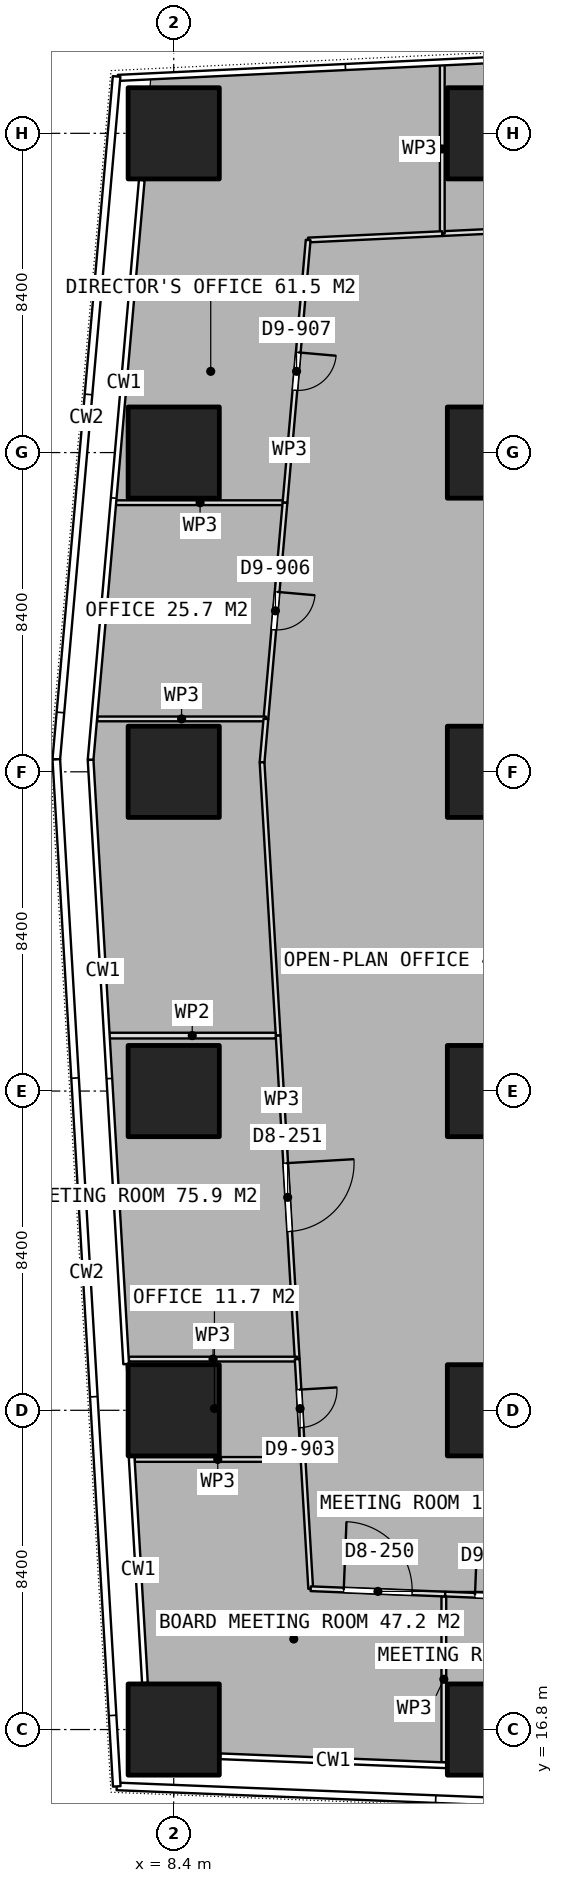
"""IFC4 building model, lengths in metres.
Left out: names, types, materials, properties, quantities, classifications, styles, units other than length and angle.
Written with IfcOpenShell. Run it as: python <this file> out.ifc"""

import sys

from ifc_helpers import new_model, si_unit, direction, frame, frame_2d, origin, origin_2d, place, context, subcontext, project, spatial, rectangle, extrude, element, fill, save


model = new_model("IFC4")
c1 = context("Model", 3, precision=1e-05, world=origin(), true_north=direction((0.0, 1.0)))
c2 = subcontext(c1, "Body", "Model", "MODEL_VIEW")
j1 = project(units=[si_unit("LENGTHUNIT", "METRE"), si_unit("PLANEANGLEUNIT", "RADIAN")], contexts=[c1])
p1 = place(None, origin())
s1 = spatial("IfcSite", under=j1, at=p1, CompositionType="ELEMENT")
p2 = place(p1, origin())
s2 = spatial("IfcBuilding", under=s1, at=p2, CompositionType="ELEMENT")
p3 = place(p2, frame((0.0, 0.0, 228.95)))
s3 = spatial("IfcBuildingStorey", under=s2, at=p3, CompositionType="ELEMENT", Elevation=228.95)
for number, where, z_axis, x_axis in (
    (1, (8.4, 16.8, 0.0), (0.0, 0.0, 1.0), (1.0, 0.0, 0.0)),
    (2, (8.4, 25.2, 0.0), (0.0, 0.0, 1.0), (1.0, 0.0, 0.0)),
    (3, (8.4, 33.6, 0.0), (0.0, 0.0, 1.0), (1.0, 0.0, 0.0)),
    (4, (8.4, 42.0, 0.0), (0.0, 0.0, 1.0), (1.0, 0.0, 0.0)),
    (5, (8.4, 50.4, 0.0), (0.0, 0.0, 1.0), (1.0, 0.0, 0.0)),
    (6, (8.4, 58.8, 0.0), (0.0, 0.0, 1.0), (1.0, 0.0, 0.0)),
    (7, (16.8, 16.8, 0.0), (0.0, 0.0, 1.0), (1.0, 0.0, 0.0)),
    (8, (16.8, 25.2, 0.0), (0.0, 0.0, 1.0), (1.0, 0.0, 0.0)),
    (9, (16.8, 33.6, 0.0), (0.0, 0.0, 1.0), (1.0, 0.0, 0.0)),
    (10, (16.8, 42.0, 0.0), (0.0, 0.0, 1.0), (1.0, 0.0, 0.0)),
    (11, (16.8, 50.4, 0.0), (0.0, 0.0, 1.0), (1.0, 0.0, 0.0)),
    (12, (16.8, 58.8, 0.0), (0.0, 0.0, 1.0), (1.0, 0.0, 0.0)),
):
    element("IfcColumn", number, at=place(p3, frame(where, z_axis=z_axis, x_axis=x_axis)), inside=s3, PredefinedType="COLUMN", context=c2, shape_type="SweptSolid", body=[
        extrude(rectangle(XDim=2.4, YDim=2.4, at=origin_2d()), origin(), (0.0, 0.0, 1.0), 3.75),
    ])
p4 = place(p3, frame((23.792, 56.559, 0.0), z_axis=(0.0, 0.0, 1.0), x_axis=(-0.998858041753, -0.047776693337, 0.0)))
e13 = element("IfcWall", 13, at=p4, inside=s3, PredefinedType="PARTITIONING", context=c2, shape_type="SweptSolid", body=[
    extrude(rectangle(XDim=8.334, YDim=0.125, at=frame_2d((4.167, 0.0))), origin(), (0.0, 0.0, 1.0), 3.5),
])
p5 = place(p3, frame((15.467, 56.161, 0.0), z_axis=(0.0, 0.0, 1.0), x_axis=(0.0, 1.0, 0.0)))
e14 = element("IfcWall", 14, at=p5, inside=s3, PredefinedType="PARTITIONING", context=c2, shape_type="SweptSolid", body=[
    extrude(rectangle(XDim=4.456, YDim=0.125, at=frame_2d((2.228, 0.0))), origin(), (0.0, 0.0, 1.0), 3.5),
])
p6 = place(p3, frame((11.328, 49.081, 0.0), z_axis=(0.0, 0.0, 1.0), x_axis=(-1.0, 0.0, 0.0)))
e15 = element("IfcWall", 15, at=p6, inside=s3, PredefinedType="PARTITIONING", context=c2, shape_type="SweptSolid", body=[
    extrude(rectangle(XDim=4.468, YDim=0.125, at=frame_2d((2.234, 0.0))), origin(), (0.0, 0.0, 1.0), 3.5),
])
p7 = place(p3, frame((15.466, 56.161, 0.0), z_axis=(0.0, 0.0, 1.0), x_axis=(-0.998868606823, -0.047555297315, 0.0)))
e16 = element("IfcWall", 16, at=p7, inside=s3, PredefinedType="PARTITIONING", context=c2, shape_type="SweptSolid", body=[
    extrude(rectangle(XDim=3.532, YDim=0.125, at=frame_2d((1.766, 0.0))), origin(), (0.0, 0.0, 1.0), 3.5),
])
p8 = place(p3, frame((11.938, 55.993, 0.0), z_axis=(0.0, 0.0, 1.0), x_axis=(-0.087927696719, -0.996126859466, 0.0)))
e17 = element("IfcWall", 17, at=p8, inside=s3, PredefinedType="PARTITIONING", context=c2, shape_type="SweptSolid", body=[
    extrude(rectangle(XDim=6.939, YDim=0.125, at=frame_2d((3.469, 0.0))), origin(), (0.0, 0.0, 1.0), 3.5),
])
p9 = place(p8, frame((2.969, 0.0, 0.0)))
e18 = element("IfcOpeningElement", 18, at=p9, cuts=e17, PredefinedType="OPENING", context=c2, shape_type="SweptSolid", body=[
    extrude(rectangle(XDim=1.0, YDim=2.1, at=frame_2d((0.5, 1.05))), frame((0.0, 0.073, 0.0), z_axis=(0.0, -1.0, 0.0), x_axis=(1.0, 0.0, 0.0)), (0.0, 0.0, 1.0), 0.145),
])
p10 = place(p3, frame((11.328, 49.08, 0.0), z_axis=(0.0, 0.0, 1.0), x_axis=(-0.087906288429, -0.996128748935, 0.0)))
e19 = element("IfcWall", 19, at=p10, inside=s3, PredefinedType="PARTITIONING", context=c2, shape_type="SweptSolid", body=[
    extrude(rectangle(XDim=5.71, YDim=0.125, at=frame_2d((2.855, 0.0))), origin(), (0.0, 0.0, 1.0), 3.5),
])
p11 = place(p10, frame((2.355, 0.0, 0.0)))
e20 = element("IfcOpeningElement", 20, at=p11, cuts=e19, PredefinedType="OPENING", context=c2, shape_type="SweptSolid", body=[
    extrude(rectangle(XDim=1.0, YDim=2.1, at=frame_2d((0.5, 1.05))), frame((0.0, 0.073, 0.0), z_axis=(0.0, -1.0, 0.0), x_axis=(1.0, 0.0, 0.0)), (0.0, 0.0, 1.0), 0.145),
])
p12 = place(p3, frame((10.826, 43.392, 0.0), z_axis=(0.0, 0.0, 1.0), x_axis=(-1.0, 0.0, 0.0)))
e21 = element("IfcWall", 21, at=p12, inside=s3, PredefinedType="PARTITIONING", context=c2, shape_type="SweptSolid", body=[
    extrude(rectangle(XDim=4.438, YDim=0.125, at=frame_2d((2.219, 0.0))), origin(), (0.0, 0.0, 1.0), 3.5),
])
p13 = place(p3, frame((10.826, 43.391, 0.0), z_axis=(0.0, 0.0, 1.0), x_axis=(-0.087943526258, -0.996125462073, 0.0)))
e22 = element("IfcWall", 22, at=p13, inside=s3, PredefinedType="PARTITIONING", context=c2, shape_type="SweptSolid", body=[
    extrude(rectangle(XDim=1.146, YDim=0.125, at=frame_2d((0.573, 0.0))), origin(), (0.0, 0.0, 1.0), 3.5),
])
p14 = place(p3, frame((10.725, 42.249, 0.0), z_axis=(0.0, 0.0, 1.0), x_axis=(0.058718047248, -0.998274606973, 0.0)))
e23 = element("IfcWall", 23, at=p14, inside=s3, PredefinedType="PARTITIONING", context=c2, shape_type="SweptSolid", body=[
    extrude(rectangle(XDim=7.201, YDim=0.125, at=frame_2d((3.601, 0.0))), origin(), (0.0, 0.0, 1.0), 3.5),
])
p15 = place(p3, frame((11.148, 35.06, 0.0), z_axis=(0.0, 0.0, 1.0), x_axis=(0.058747195918, -0.998272892035, 0.0)))
e24 = element("IfcWall", 24, at=p15, inside=s3, PredefinedType="PARTITIONING", context=c2, shape_type="SweptSolid", body=[
    extrude(rectangle(XDim=8.528, YDim=0.125, at=frame_2d((4.264, 0.0))), origin(), (0.0, 0.0, 1.0), 3.5),
])
p16 = place(p15, frame((3.364, 0.0, 0.0)))
e25 = element("IfcOpeningElement", 25, at=p16, cuts=e24, PredefinedType="OPENING", context=c2, shape_type="SweptSolid", body=[
    extrude(rectangle(XDim=1.8, YDim=2.1, at=frame_2d((0.9, 1.05))), frame((0.0, 0.073, 0.0), z_axis=(0.0, -1.0, 0.0), x_axis=(1.0, 0.0, 0.0)), (0.0, 0.0, 1.0), 0.145),
])
p17 = place(p3, frame((11.649, 26.547, 0.0), z_axis=(0.0, 0.0, 1.0), x_axis=(-1.0, 0.0, 0.0)))
e26 = element("IfcWall", 26, at=p17, inside=s3, PredefinedType="PARTITIONING", context=c2, shape_type="SweptSolid", body=[
    extrude(rectangle(XDim=4.428, YDim=0.125, at=frame_2d((2.214, 0.0))), origin(), (0.0, 0.0, 1.0), 3.5),
])
p18 = place(p3, frame((11.649, 26.546, 0.0), z_axis=(0.0, 0.0, 1.0), x_axis=(0.058711043696, -0.998275018894, 0.0)))
e27 = element("IfcWall", 27, at=p18, inside=s3, PredefinedType="PARTITIONING", context=c2, shape_type="SweptSolid", body=[
    extrude(rectangle(XDim=2.607, YDim=0.125, at=frame_2d((1.304, 0.0))), origin(), (0.0, 0.0, 1.0), 3.5),
])
p19 = place(p18, frame((0.804, 0.0, 0.0)))
e28 = element("IfcOpeningElement", 28, at=p19, cuts=e27, PredefinedType="OPENING", context=c2, shape_type="SweptSolid", body=[
    extrude(rectangle(XDim=1.0, YDim=2.1, at=frame_2d((0.5, 1.05))), frame((0.0, 0.073, 0.0), z_axis=(0.0, -1.0, 0.0), x_axis=(1.0, 0.0, 0.0)), (0.0, 0.0, 1.0), 0.145),
])
p20 = place(p3, frame((11.741, 23.907, 0.0), z_axis=(0.0, 0.0, 1.0), x_axis=(-1.0, 0.0, 0.0)))
e29 = element("IfcWall", 29, at=p20, inside=s3, PredefinedType="PARTITIONING", context=c2, shape_type="SweptSolid", body=[
    extrude(rectangle(XDim=4.364, YDim=0.125, at=frame_2d((2.182, 0.0))), origin(), (0.0, 0.0, 1.0), 3.5),
])
p21 = place(p3, frame((15.508, 20.303, 0.0), z_axis=(0.0, 0.0, 1.0), x_axis=(0.0, -1.0, 0.0)))
e30 = element("IfcWall", 30, at=p21, inside=s3, PredefinedType="PARTITIONING", context=c2, shape_type="SweptSolid", body=[
    extrude(rectangle(XDim=4.361, YDim=0.125, at=frame_2d((2.181, 0.0))), origin(), (0.0, 0.0, 1.0), 3.5),
])
p22 = place(p3, frame((11.802, 23.942, 0.0), z_axis=(0.0, 0.0, 1.0), x_axis=(0.058925701835, -0.998262371155, 0.0)))
e31 = element("IfcWall", 31, at=p22, inside=s3, PredefinedType="PARTITIONING", context=c2, shape_type="SweptSolid", body=[
    extrude(rectangle(XDim=3.443, YDim=0.125, at=frame_2d((1.722, 0.0))), origin(), (0.0, 0.0, 1.0), 3.5),
])
p23 = place(p3, frame((12.005, 20.505, 0.0), z_axis=(0.0, 0.0, 1.0), x_axis=(0.999208321211, -0.039783549637, 0.0)))
e32 = element("IfcWall", 32, at=p23, inside=s3, PredefinedType="PARTITIONING", context=c2, shape_type="SweptSolid", body=[
    extrude(rectangle(XDim=3.541, YDim=0.125, at=frame_2d((1.771, 0.0))), origin(), (0.0, 0.0, 1.0), 3.5),
])
p24 = place(p23, frame((0.87, 0.0, 0.0)))
e33 = element("IfcOpeningElement", 33, at=p24, cuts=e32, PredefinedType="OPENING", context=c2, shape_type="SweptSolid", body=[
    extrude(rectangle(XDim=1.8, YDim=2.1, at=frame_2d((0.9, 1.05))), frame((0.0, 0.073, 0.0), z_axis=(0.0, -1.0, 0.0), x_axis=(1.0, 0.0, 0.0)), (0.0, 0.0, 1.0), 0.145),
])
p25 = place(p3, frame((15.544, 20.364, 0.0), z_axis=(0.0, 0.0, 1.0), x_axis=(0.999194259908, -0.040135158736, 0.0)))
e34 = element("IfcWall", 34, at=p25, inside=s3, PredefinedType="PARTITIONING", context=c2, shape_type="SweptSolid", body=[
    extrude(rectangle(XDim=2.567, YDim=0.125, at=frame_2d((1.283, 0.0))), origin(), (0.0, 0.0, 1.0), 3.5),
])
p26 = place(p25, frame((0.784, 0.0, 0.0)))
e35 = element("IfcOpeningElement", 35, at=p26, cuts=e34, PredefinedType="OPENING", context=c2, shape_type="SweptSolid", body=[
    extrude(rectangle(XDim=1.0, YDim=2.1, at=frame_2d((0.5, 1.05))), frame((0.0, 0.073, 0.0), z_axis=(0.0, -1.0, 0.0), x_axis=(1.0, 0.0, 0.0)), (0.0, 0.0, 1.0), 0.145),
])
p27 = place(p3, frame((11.085, 35.059, 0.0), z_axis=(0.0, 0.0, 1.0), x_axis=(-1.0, 0.0, 0.0)))
e36 = element("IfcWall", 36, at=p27, inside=s3, PredefinedType="PARTITIONING", context=c2, shape_type="SweptSolid", body=[
    extrude(rectangle(XDim=4.395, YDim=0.15, at=frame_2d((2.198, 0.0))), origin(), (0.0, 0.0, 1.0), 3.5),
])
p28 = place(p9, origin())
e37 = element("IfcDoor", 37, at=p28, inside=s3, OperationType="SINGLE_SWING_LEFT", PredefinedType="DOOR", context=c2, shape_type="SweptSolid", body=[
    extrude(rectangle(XDim=1.0, YDim=2.1, at=frame_2d((0.5, 1.05))), frame((0.0, 0.025, 0.0), z_axis=(0.0, -1.0, 0.0), x_axis=(1.0, 0.0, 0.0)), (0.0, 0.0, 1.0), 0.05),
])
fill(e18, e37)
p29 = place(p11, origin())
e38 = element("IfcDoor", 38, at=p29, inside=s3, OperationType="SINGLE_SWING_LEFT", PredefinedType="DOOR", context=c2, shape_type="SweptSolid", body=[
    extrude(rectangle(XDim=1.0, YDim=2.1, at=frame_2d((0.5, 1.05))), frame((0.0, 0.025, 0.0), z_axis=(0.0, -1.0, 0.0), x_axis=(1.0, 0.0, 0.0)), (0.0, 0.0, 1.0), 0.05),
])
fill(e20, e38)
p30 = place(p16, origin())
e39 = element("IfcDoor", 39, at=p30, inside=s3, OperationType="DOUBLE_DOOR_SINGLE_SWING", PredefinedType="DOOR", context=c2, shape_type="SweptSolid", body=[
    extrude(rectangle(XDim=1.8, YDim=2.1, at=frame_2d((0.9, 1.05))), frame((0.0, 0.025, 0.0), z_axis=(0.0, -1.0, 0.0), x_axis=(1.0, 0.0, 0.0)), (0.0, 0.0, 1.0), 0.05),
])
fill(e25, e39)
p31 = place(p19, origin())
e40 = element("IfcDoor", 40, at=p31, inside=s3, OperationType="SINGLE_SWING_LEFT", PredefinedType="DOOR", context=c2, shape_type="SweptSolid", body=[
    extrude(rectangle(XDim=1.0, YDim=2.1, at=frame_2d((0.5, 1.05))), frame((0.0, 0.025, 0.0), z_axis=(0.0, -1.0, 0.0), x_axis=(1.0, 0.0, 0.0)), (0.0, 0.0, 1.0), 0.05),
])
fill(e28, e40)
p32 = place(p24, origin())
e41 = element("IfcDoor", 41, at=p32, inside=s3, OperationType="DOUBLE_DOOR_SINGLE_SWING", PredefinedType="DOOR", context=c2, shape_type="SweptSolid", body=[
    extrude(rectangle(XDim=1.8, YDim=2.1, at=frame_2d((0.9, 1.05))), frame((0.0, 0.025, 0.0), z_axis=(0.0, -1.0, 0.0), x_axis=(1.0, 0.0, 0.0)), (0.0, 0.0, 1.0), 0.05),
])
fill(e33, e41)
p33 = place(p26, origin())
e42 = element("IfcDoor", 42, at=p33, inside=s3, OperationType="SINGLE_SWING_LEFT", PredefinedType="DOOR", context=c2, shape_type="SweptSolid", body=[
    extrude(rectangle(XDim=1.0, YDim=2.1, at=frame_2d((0.5, 1.05))), frame((0.0, 0.025, 0.0), z_axis=(0.0, -1.0, 0.0), x_axis=(1.0, 0.0, 0.0)), (0.0, 0.0, 1.0), 0.05),
])
fill(e35, e42)
save(model, sys.argv[1])
